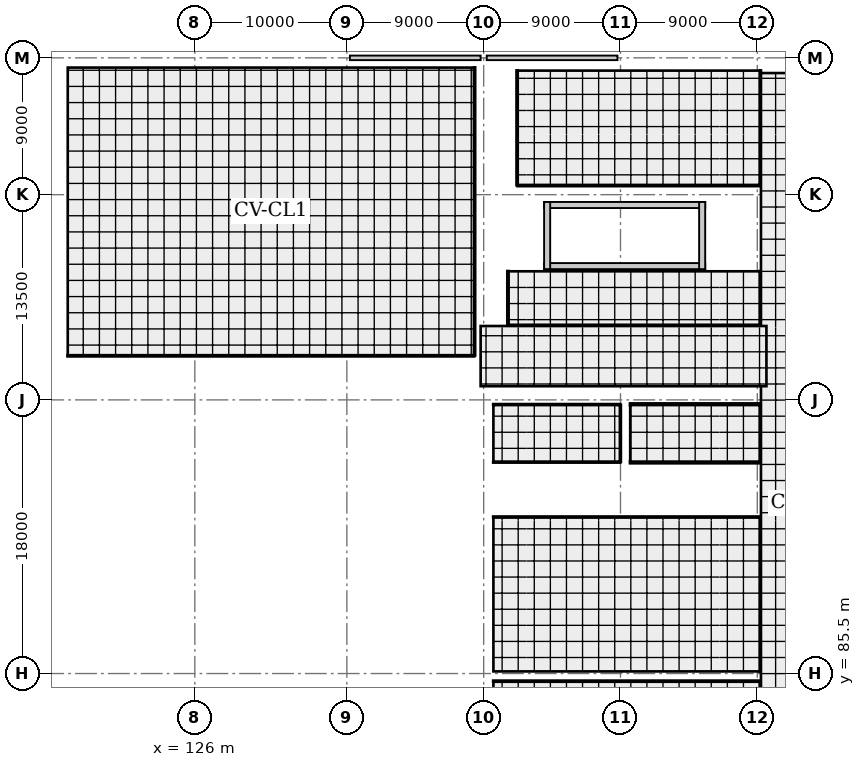
"""IFC4 building model, lengths in metres.
Left out: names, types, materials, properties, quantities, classifications, styles, units other than length and angle.
Written with IfcOpenShell. Run it as: python <this file> out.ifc"""

import sys

from ifc_helpers import new_model, si_unit, direction, frame, frame_2d, origin, origin_2d, place, context, subcontext, project, spatial, rectangle, i_section, extrude, element, fill, save


model = new_model("IFC4")
c1 = context("Model", 3, precision=1e-05, world=origin(), true_north=direction((0.0, 1.0)))
c2 = subcontext(c1, "Body", "Model", "MODEL_VIEW")
j1 = project(units=[si_unit("LENGTHUNIT", "METRE"), si_unit("PLANEANGLEUNIT", "RADIAN")], contexts=[c1])
p1 = place(None, origin())
s1 = spatial("IfcSite", under=j1, at=p1, CompositionType="ELEMENT")
p2 = place(p1, origin())
s2 = spatial("IfcBuilding", under=s1, at=p2, CompositionType="ELEMENT")
p3 = place(p2, frame((0.0, 0.0, 10.8)))
s3 = spatial("IfcBuildingStorey", under=s2, at=p3, CompositionType="ELEMENT", Elevation=10.8)
p4 = place(p3, frame((117.0, 103.5, 0.0), z_axis=(0.0, 0.0, 1.0), x_axis=(1.0, 0.0, 0.0)))
e1 = element("IfcColumn", 1, at=p4, inside=s3, PredefinedType="COLUMN", context=c2, shape_type="SweptSolid", body=[
    extrude(rectangle(XDim=1.2, YDim=1.0, at=origin_2d()), origin(), (0.0, 0.0, 1.0), 3.35),
])
for number, where, z_axis, x_axis in (
    (2, (117.0, 117.0, 0.0), (0.0, 0.0, 1.0), (1.0, 0.0, 0.0)),
    (3, (117.0, 126.0, 0.0), (0.0, 0.0, 1.0), (1.0, 0.0, 0.0)),
):
    element("IfcColumn", number, at=place(p3, frame(where, z_axis=z_axis, x_axis=x_axis)), inside=s3, PredefinedType="COLUMN", context=c2, shape_type="SweptSolid", body=[
        extrude(i_section(OverallWidth=0.4, OverallDepth=0.408, WebThickness=0.021, FlangeThickness=0.021, FilletRadius=0.022, at=origin_2d()), origin(), (0.0, 0.0, 1.0), 3.6),
    ])
for number, where, z_axis, x_axis in (
    (4, (126.0, 85.5, 0.0), (0.0, 0.0, 1.0), (1.0, 0.0, 0.0)),
    (5, (126.0, 94.5, 0.0), (0.0, 0.0, 1.0), (1.0, 0.0, 0.0)),
    (6, (126.0, 103.5, 0.0), (0.0, 0.0, 1.0), (1.0, 0.0, 0.0)),
):
    element("IfcColumn", number, at=place(p3, frame(where, z_axis=z_axis, x_axis=x_axis)), inside=s3, PredefinedType="COLUMN", context=c2, shape_type="SweptSolid", body=[
        extrude(rectangle(XDim=1.2, YDim=1.0, at=origin_2d()), origin(), (0.0, 0.0, 1.0), 3.35),
    ])
for number, where, z_axis, x_axis in (
    (7, (126.0, 117.0, 0.0), (0.0, 0.0, 1.0), (1.0, 0.0, 0.0)),
    (8, (126.0, 126.0, 0.0), (0.0, 0.0, 1.0), (1.0, 0.0, 0.0)),
    (9, (136.0, 103.5, 0.0), (0.0, 0.0, 1.0), (1.0, 0.0, 0.0)),
    (10, (136.0, 117.0, 0.0), (0.0, 0.0, 1.0), (1.0, 0.0, 0.0)),
    (11, (136.0, 126.0, 0.0), (0.0, 0.0, 1.0), (1.0, 0.0, 0.0)),
    (12, (145.0, 85.5, 0.0), (0.0, 0.0, 1.0), (1.0, 0.0, 0.0)),
    (13, (145.0, 94.5, 0.0), (0.0, 0.0, 1.0), (1.0, 0.0, 0.0)),
    (14, (145.0, 103.5, 0.0), (0.0, 0.0, 1.0), (1.0, 0.0, 0.0)),
    (15, (145.0, 117.0, 0.0), (0.0, 0.0, 1.0), (1.0, 0.0, 0.0)),
    (16, (145.0, 126.0, 0.0), (0.0, 0.0, 1.0), (1.0, 0.0, 0.0)),
    (17, (154.0, 85.5, 0.0), (0.0, 0.0, 1.0), (1.0, 0.0, 0.0)),
    (18, (154.0, 94.5, 0.0), (0.0, 0.0, 1.0), (1.0, 0.0, 0.0)),
    (19, (154.0, 103.5, 0.0), (0.0, 0.0, 1.0), (1.0, 0.0, 0.0)),
    (20, (154.0, 117.0, 0.0), (0.0, 0.0, 1.0), (1.0, 0.0, 0.0)),
    (21, (154.0, 126.0, 0.0), (0.0, 0.0, 1.0), (1.0, 0.0, 0.0)),
    (22, (163.0, 85.5, 0.0), (0.0, 0.0, 1.0), (1.0, 0.0, 0.0)),
    (23, (163.0, 94.5, 0.0), (0.0, 0.0, 1.0), (1.0, 0.0, 0.0)),
    (24, (163.0, 103.5, 0.0), (0.0, 0.0, 1.0), (1.0, 0.0, 0.0)),
    (25, (163.0, 117.0, 0.0), (0.0, 0.0, 1.0), (1.0, 0.0, 0.0)),
    (26, (163.0, 126.0, 0.0), (0.0, 0.0, 1.0), (1.0, 0.0, 0.0)),
):
    element("IfcColumn", number, at=place(p3, frame(where, z_axis=z_axis, x_axis=x_axis)), inside=s3, PredefinedType="COLUMN", context=c2, shape_type="SweptSolid", body=[
        extrude(i_section(OverallWidth=0.4, OverallDepth=0.408, WebThickness=0.021, FlangeThickness=0.021, FilletRadius=0.022, at=origin_2d()), origin(), (0.0, 0.0, 1.0), 3.6),
    ])
p5 = place(p3, frame((136.2, 126.0, 0.0), z_axis=(0.0, 0.0, 1.0), x_axis=(1.0, 0.0, 0.0)))
e27 = element("IfcWall", 27, at=p5, inside=s3, PredefinedType="SOLIDWALL", context=c2, shape_type="SweptSolid", body=[
    extrude(rectangle(XDim=8.6, YDim=0.3, at=frame_2d((4.3, 0.0))), origin(), (0.0, 0.0, 1.0), 2.895),
])
p6 = place(p5, frame((1.365, 0.0, 0.9)))
e28 = element("IfcOpeningElement", 28, at=p6, cuts=e27, PredefinedType="OPENING", context=c2, shape_type="SweptSolid", body=[
    extrude(rectangle(XDim=1.8, YDim=1.5, at=frame_2d((0.9, 0.75))), frame((0.0, 0.16, 0.0), z_axis=(0.0, -1.0, 0.0), x_axis=(1.0, 0.0, 0.0)), (0.0, 0.0, 1.0), 0.32),
])
p7 = place(p5, frame((5.585, 0.0, 0.9)))
e29 = element("IfcOpeningElement", 29, at=p7, cuts=e27, PredefinedType="OPENING", context=c2, shape_type="SweptSolid", body=[
    extrude(rectangle(XDim=1.5, YDim=1.5, at=frame_2d((0.75, 0.75))), frame((0.0, 0.16, 0.0), z_axis=(0.0, -1.0, 0.0), x_axis=(1.0, 0.0, 0.0)), (0.0, 0.0, 1.0), 0.32),
])
p8 = place(p3, frame((145.2, 126.0, 0.0), z_axis=(0.0, 0.0, 1.0), x_axis=(1.0, 0.0, 0.0)))
e30 = element("IfcWall", 30, at=p8, inside=s3, PredefinedType="SOLIDWALL", context=c2, shape_type="SweptSolid", body=[
    extrude(rectangle(XDim=8.6, YDim=0.3, at=frame_2d((4.3, 0.0))), origin(), (0.0, 0.0, 1.0), 2.895),
])
p9 = place(p8, frame((1.515, 0.0, 0.9)))
e31 = element("IfcOpeningElement", 31, at=p9, cuts=e30, PredefinedType="OPENING", context=c2, shape_type="SweptSolid", body=[
    extrude(rectangle(XDim=1.5, YDim=1.5, at=frame_2d((0.75, 0.75))), frame((0.0, 0.16, 0.0), z_axis=(0.0, -1.0, 0.0), x_axis=(1.0, 0.0, 0.0)), (0.0, 0.0, 1.0), 0.32),
])
p10 = place(p8, frame((5.735, 0.0, 0.9)))
e32 = element("IfcOpeningElement", 32, at=p10, cuts=e30, PredefinedType="OPENING", context=c2, shape_type="SweptSolid", body=[
    extrude(rectangle(XDim=1.2, YDim=1.4, at=frame_2d((0.6, 0.7))), frame((0.0, 0.16, 0.0), z_axis=(0.0, -1.0, 0.0), x_axis=(1.0, 0.0, 0.0)), (0.0, 0.0, 1.0), 0.32),
])
p11 = place(p3, frame((148.975, 112.3, 0.0), z_axis=(0.0, 0.0, 1.0), x_axis=(1.0, 0.0, 0.0)))
e33 = element("IfcWall", 33, at=p11, inside=s3, PredefinedType="SHEAR", context=c2, shape_type="SweptSolid", body=[
    extrude(rectangle(XDim=10.597, YDim=0.4, at=frame_2d((5.299, 0.0))), origin(), (0.0, 0.0, 1.0), 3.38),
])
p12 = place(p11, frame((0.55, 0.0, 0.0)))
e34 = element("IfcOpeningElement", 34, at=p12, cuts=e33, PredefinedType="OPENING", context=c2, shape_type="SweptSolid", body=[
    extrude(rectangle(XDim=1.3, YDim=2.1, at=frame_2d((0.65, 1.05))), frame((0.0, 0.21, 0.0), z_axis=(0.0, -1.0, 0.0), x_axis=(1.0, 0.0, 0.0)), (0.0, 0.0, 1.0), 0.42),
])
p13 = place(p3, frame((159.573, 116.32, 0.0), z_axis=(0.0, 0.0, 1.0), x_axis=(-1.0, 0.0, 0.0)))
e35 = element("IfcWall", 35, at=p13, inside=s3, PredefinedType="SHEAR", context=c2, shape_type="SweptSolid", body=[
    extrude(rectangle(XDim=10.597, YDim=0.4, at=frame_2d((5.299, 0.0))), origin(), (0.0, 0.0, 1.0), 3.38),
])
for number, where, z_axis, x_axis in (
    (36, (159.373, 112.1, 0.0), (0.0, 0.0, 1.0), (0.0, 1.0, 0.0)),
    (37, (149.175, 116.52, 0.0), (0.0, 0.0, 1.0), (0.0, -1.0, 0.0)),
):
    element("IfcWall", number, at=place(p3, frame(where, z_axis=z_axis, x_axis=x_axis)), inside=s3, PredefinedType="SHEAR", context=c2, shape_type="SweptSolid", body=[
        extrude(rectangle(XDim=4.42, YDim=0.4, at=frame_2d((2.21, 0.0))), origin(), (0.0, 0.0, 1.0), 3.38),
    ])
p14 = place(p3, frame((144.4, 106.4, 0.0), z_axis=(0.0, 0.0, 1.0), x_axis=(-1.0, 0.0, 0.0)))
e38 = element("IfcWall", 38, at=p14, inside=s3, PredefinedType="PARTITIONING", context=c2, shape_type="SweptSolid", body=[
    extrude(rectangle(XDim=26.8, YDim=0.13, at=frame_2d((13.4, 0.0))), origin(), (0.0, 0.0, 1.0), 2.755),
])
p15 = place(p3, frame((144.4, 125.4, 0.0), z_axis=(0.0, 0.0, 1.0), x_axis=(0.0, -1.0, 0.0)))
e39 = element("IfcWall", 39, at=p15, inside=s3, PredefinedType="PARTITIONING", context=c2, shape_type="SweptSolid", body=[
    extrude(rectangle(XDim=19.0, YDim=0.13, at=frame_2d((9.5, 0.0))), origin(), (0.0, 0.0, 1.0), 2.755),
])
p16 = place(p15, frame((9.225, 0.0, 0.0)))
e40 = element("IfcOpeningElement", 40, at=p16, cuts=e39, PredefinedType="OPENING", context=c2, shape_type="SweptSolid", body=[
    extrude(rectangle(XDim=1.55, YDim=2.1, at=frame_2d((0.775, 1.05))), frame((0.0, 0.075, 0.0), z_axis=(0.0, -1.0, 0.0), x_axis=(1.0, 0.0, 0.0)), (0.0, 0.0, 1.0), 0.15),
])
p17 = place(p3, frame((145.6, 85.0, 0.0), z_axis=(0.0, 0.0, 1.0), x_axis=(1.0, 0.0, 0.0)))
e41 = element("IfcWall", 41, at=p17, inside=s3, PredefinedType="PARTITIONING", context=c2, shape_type="SweptSolid", body=[
    extrude(rectangle(XDim=17.6, YDim=0.12, at=frame_2d((8.8, 0.0))), origin(), (0.0, 0.0, 1.0), 2.915),
])
p18 = place(p3, frame((163.2, 85.0, 0.0), z_axis=(0.0, 0.0, 1.0), x_axis=(0.0, -1.0, 0.0)))
e42 = element("IfcWall", 42, at=p18, inside=s3, PredefinedType="PARTITIONING", context=c2, shape_type="SweptSolid", body=[
    extrude(rectangle(XDim=16.8, YDim=0.12, at=frame_2d((8.4, 0.0))), origin(), (0.0, 0.0, 1.0), 2.915),
])
p19 = place(p18, frame((9.375, 0.0, 0.0)))
e43 = element("IfcOpeningElement", 43, at=p19, cuts=e42, PredefinedType="OPENING", context=c2, shape_type="SweptSolid", body=[
    extrude(rectangle(XDim=1.25, YDim=2.1, at=frame_2d((0.625, 1.05))), frame((0.0, 0.07, 0.0), z_axis=(0.0, -1.0, 0.0), x_axis=(1.0, 0.0, 0.0)), (0.0, 0.0, 1.0), 0.14),
])
p20 = place(p3, frame((145.6, 95.8, 0.0), z_axis=(0.0, 0.0, 1.0), x_axis=(1.0, 0.0, 0.0)))
e44 = element("IfcWall", 44, at=p20, inside=s3, PredefinedType="PARTITIONING", context=c2, shape_type="SweptSolid", body=[
    extrude(rectangle(XDim=17.6, YDim=0.11, at=frame_2d((8.8, 0.0))), origin(), (0.0, 0.0, 1.0), 2.965),
])
p21 = place(p3, frame((163.2, 95.8, 0.0), z_axis=(0.0, 0.0, 1.0), x_axis=(0.0, -1.0, 0.0)))
e45 = element("IfcWall", 45, at=p21, inside=s3, PredefinedType="PARTITIONING", context=c2, shape_type="SweptSolid", body=[
    extrude(rectangle(XDim=10.2, YDim=0.11, at=frame_2d((5.1, 0.0))), origin(), (0.0, 0.0, 1.0), 2.915),
])
p22 = place(p21, frame((4.525, 0.0, 0.0)))
e46 = element("IfcOpeningElement", 46, at=p22, cuts=e45, PredefinedType="OPENING", context=c2, shape_type="SweptSolid", body=[
    extrude(rectangle(XDim=1.15, YDim=2.1, at=frame_2d((0.575, 1.05))), frame((0.0, 0.065, 0.0), z_axis=(0.0, -1.0, 0.0), x_axis=(1.0, 0.0, 0.0)), (0.0, 0.0, 1.0), 0.13),
])
p23 = place(p3, frame((154.0, 99.4, 0.0), z_axis=(0.0, 0.0, 1.0), x_axis=(-1.0, 0.0, 0.0)))
e47 = element("IfcWall", 47, at=p23, inside=s3, PredefinedType="PARTITIONING", context=c2, shape_type="SweptSolid", body=[
    extrude(rectangle(XDim=8.4, YDim=0.1, at=frame_2d((4.2, 0.0))), origin(), (0.0, 0.0, 1.0), 2.965),
])
p24 = place(p23, frame((3.75, 0.0, 0.0)))
e48 = element("IfcOpeningElement", 48, at=p24, cuts=e47, PredefinedType="OPENING", context=c2, shape_type="SweptSolid", body=[
    extrude(rectangle(XDim=0.9, YDim=2.1, at=frame_2d((0.45, 1.05))), frame((0.0, 0.06, 0.0), z_axis=(0.0, -1.0, 0.0), x_axis=(1.0, 0.0, 0.0)), (0.0, 0.0, 1.0), 0.12),
])
p25 = place(p3, frame((145.6, 103.2, 0.0), z_axis=(0.0, 0.0, 1.0), x_axis=(1.0, 0.0, 0.0)))
e49 = element("IfcWall", 49, at=p25, inside=s3, PredefinedType="PARTITIONING", context=c2, shape_type="SweptSolid", body=[
    extrude(rectangle(XDim=8.4, YDim=0.1, at=frame_2d((4.2, 0.0))), origin(), (0.0, 0.0, 1.0), 2.755),
])
p26 = place(p3, frame((154.0, 103.2, 0.0), z_axis=(0.0, 0.0, 1.0), x_axis=(0.0, -1.0, 0.0)))
e50 = element("IfcWall", 50, at=p26, inside=s3, PredefinedType="PARTITIONING", context=c2, shape_type="SweptSolid", body=[
    extrude(rectangle(XDim=3.8, YDim=0.1, at=frame_2d((1.9, 0.0))), origin(), (0.0, 0.0, 1.0), 2.915),
])
p27 = place(p3, frame((163.2, 99.4, 0.0), z_axis=(0.0, 0.0, 1.0), x_axis=(-1.0, 0.0, 0.0)))
e51 = element("IfcWall", 51, at=p27, inside=s3, PredefinedType="PARTITIONING", context=c2, shape_type="SweptSolid", body=[
    extrude(rectangle(XDim=8.6, YDim=0.19, at=frame_2d((4.3, 0.0))), origin(), (0.0, 0.0, 1.0), 2.965),
])
p28 = place(p27, frame((3.85, 0.0, 0.0)))
e52 = element("IfcOpeningElement", 52, at=p28, cuts=e51, PredefinedType="OPENING", context=c2, shape_type="SweptSolid", body=[
    extrude(rectangle(XDim=0.9, YDim=2.1, at=frame_2d((0.45, 1.05))), frame((0.0, 0.105, 0.0), z_axis=(0.0, -1.0, 0.0), x_axis=(1.0, 0.0, 0.0)), (0.0, 0.0, 1.0), 0.21),
])
p29 = place(p3, frame((154.6, 103.2, 0.0), z_axis=(0.0, 0.0, 1.0), x_axis=(1.0, 0.0, 0.0)))
e53 = element("IfcWall", 53, at=p29, inside=s3, PredefinedType="PARTITIONING", context=c2, shape_type="SweptSolid", body=[
    extrude(rectangle(XDim=8.6, YDim=0.19, at=frame_2d((4.3, 0.0))), origin(), (0.0, 0.0, 1.0), 2.755),
])
p30 = place(p3, frame((163.2, 103.2, 0.0), z_axis=(0.0, 0.0, 1.0), x_axis=(0.0, -1.0, 0.0)))
e54 = element("IfcWall", 54, at=p30, inside=s3, PredefinedType="PARTITIONING", context=c2, shape_type="SweptSolid", body=[
    extrude(rectangle(XDim=3.8, YDim=0.19, at=frame_2d((1.9, 0.0))), origin(), (0.0, 0.0, 1.0), 2.755),
])
p31 = place(p3, frame((163.2, 108.4, 0.0), z_axis=(0.0, 0.0, 1.0), x_axis=(-1.0, 0.0, 0.0)))
e55 = element("IfcWall", 55, at=p31, inside=s3, PredefinedType="PARTITIONING", context=c2, shape_type="SweptSolid", body=[
    extrude(rectangle(XDim=16.6, YDim=0.14, at=frame_2d((8.3, 0.0))), origin(), (0.0, 0.0, 1.0), 2.755),
])
p32 = place(p31, frame((7.725, 0.0, 0.0)))
e56 = element("IfcOpeningElement", 56, at=p32, cuts=e55, PredefinedType="OPENING", context=c2, shape_type="SweptSolid", body=[
    extrude(rectangle(XDim=1.15, YDim=2.1, at=frame_2d((0.575, 1.05))), frame((0.0, 0.08, 0.0), z_axis=(0.0, -1.0, 0.0), x_axis=(1.0, 0.0, 0.0)), (0.0, 0.0, 1.0), 0.16),
])
p33 = place(p3, frame((146.6, 108.4, 0.0), z_axis=(0.0, 0.0, 1.0), x_axis=(0.0, 1.0, 0.0)))
e57 = element("IfcWall", 57, at=p33, inside=s3, PredefinedType="PARTITIONING", context=c2, shape_type="SweptSolid", body=[
    extrude(rectangle(XDim=3.6, YDim=0.14, at=frame_2d((1.8, 0.0))), origin(), (0.0, 0.0, 1.0), 3.355),
])
p34 = place(p3, frame((163.2, 112.0, 0.0), z_axis=(0.0, 0.0, 1.0), x_axis=(0.0, -1.0, 0.0)))
e58 = element("IfcWall", 58, at=p34, inside=s3, PredefinedType="PARTITIONING", context=c2, shape_type="SweptSolid", body=[
    extrude(rectangle(XDim=3.6, YDim=0.14, at=frame_2d((1.8, 0.0))), origin(), (0.0, 0.0, 1.0), 2.755),
])
p35 = place(p3, frame((163.2, 117.6, 0.0), z_axis=(0.0, 0.0, 1.0), x_axis=(-1.0, 0.0, 0.0)))
e59 = element("IfcWall", 59, at=p35, inside=s3, PredefinedType="PARTITIONING", context=c2, shape_type="SweptSolid", body=[
    extrude(rectangle(XDim=16.0, YDim=0.13, at=frame_2d((8.0, 0.0))), origin(), (0.0, 0.0, 1.0), 2.755),
])
p36 = place(p3, frame((147.2, 117.6, 0.0), z_axis=(0.0, 0.0, 1.0), x_axis=(0.0, 1.0, 0.0)))
e60 = element("IfcWall", 60, at=p36, inside=s3, PredefinedType="PARTITIONING", context=c2, shape_type="SweptSolid", body=[
    extrude(rectangle(XDim=7.6, YDim=0.13, at=frame_2d((3.8, 0.0))), origin(), (0.0, 0.0, 1.0), 2.895),
])
p37 = place(p3, frame((163.2, 125.2, 0.0), z_axis=(0.0, 0.0, 1.0), x_axis=(0.0, -1.0, 0.0)))
e61 = element("IfcWall", 61, at=p37, inside=s3, PredefinedType="PARTITIONING", context=c2, shape_type="SweptSolid", body=[
    extrude(rectangle(XDim=7.6, YDim=0.13, at=frame_2d((3.8, 0.0))), origin(), (0.0, 0.0, 1.0), 2.755),
])
p38 = place(p37, frame((3.225, 0.0, 0.0)))
e62 = element("IfcOpeningElement", 62, at=p38, cuts=e61, PredefinedType="OPENING", context=c2, shape_type="SweptSolid", body=[
    extrude(rectangle(XDim=1.15, YDim=2.1, at=frame_2d((0.575, 1.05))), frame((0.0, 0.075, 0.0), z_axis=(0.0, -1.0, 0.0), x_axis=(1.0, 0.0, 0.0)), (0.0, 0.0, 1.0), 0.15),
])
p39 = place(p6, origin())
e63 = element("IfcWindow", 63, at=p39, inside=s3, PartitioningType="SINGLE_PANEL", PredefinedType="WINDOW", context=c2, shape_type="SweptSolid", body=[
    extrude(rectangle(XDim=1.8, YDim=1.5, at=frame_2d((0.9, 0.75))), frame((0.0, 0.03, 0.0), z_axis=(0.0, -1.0, 0.0), x_axis=(1.0, 0.0, 0.0)), (0.0, 0.0, 1.0), 0.06),
])
fill(e28, e63)
p40 = place(p7, origin())
e64 = element("IfcWindow", 64, at=p40, inside=s3, PartitioningType="SINGLE_PANEL", PredefinedType="WINDOW", context=c2, shape_type="SweptSolid", body=[
    extrude(rectangle(XDim=1.5, YDim=1.5, at=frame_2d((0.75, 0.75))), frame((0.0, 0.03, 0.0), z_axis=(0.0, -1.0, 0.0), x_axis=(1.0, 0.0, 0.0)), (0.0, 0.0, 1.0), 0.06),
])
fill(e29, e64)
p41 = place(p9, origin())
e65 = element("IfcWindow", 65, at=p41, inside=s3, PartitioningType="SINGLE_PANEL", PredefinedType="WINDOW", context=c2, shape_type="SweptSolid", body=[
    extrude(rectangle(XDim=1.5, YDim=1.5, at=frame_2d((0.75, 0.75))), frame((0.0, 0.03, 0.0), z_axis=(0.0, -1.0, 0.0), x_axis=(1.0, 0.0, 0.0)), (0.0, 0.0, 1.0), 0.06),
])
fill(e31, e65)
p42 = place(p10, origin())
e66 = element("IfcWindow", 66, at=p42, inside=s3, PartitioningType="SINGLE_PANEL", PredefinedType="WINDOW", context=c2, shape_type="SweptSolid", body=[
    extrude(rectangle(XDim=1.2, YDim=1.4, at=frame_2d((0.6, 0.7))), frame((0.0, 0.03, 0.0), z_axis=(0.0, -1.0, 0.0), x_axis=(1.0, 0.0, 0.0)), (0.0, 0.0, 1.0), 0.06),
])
fill(e32, e66)
p43 = place(p12, origin())
e67 = element("IfcDoor", 67, at=p43, inside=s3, OperationType="SINGLE_SWING_RIGHT", PredefinedType="DOOR", context=c2, shape_type="SweptSolid", body=[
    extrude(rectangle(XDim=1.3, YDim=2.1, at=frame_2d((0.65, 1.05))), frame((0.0, 0.025, 0.0), z_axis=(0.0, -1.0, 0.0), x_axis=(1.0, 0.0, 0.0)), (0.0, 0.0, 1.0), 0.05),
])
fill(e34, e67)
p44 = place(p16, origin())
e68 = element("IfcDoor", 68, at=p44, inside=s3, OperationType="SINGLE_SWING_RIGHT", PredefinedType="DOOR", context=c2, shape_type="SweptSolid", body=[
    extrude(rectangle(XDim=1.55, YDim=2.1, at=frame_2d((0.775, 1.05))), frame((0.0, 0.025, 0.0), z_axis=(0.0, -1.0, 0.0), x_axis=(1.0, 0.0, 0.0)), (0.0, 0.0, 1.0), 0.05),
])
fill(e40, e68)
p45 = place(p22, origin())
e69 = element("IfcDoor", 69, at=p45, inside=s3, OperationType="SINGLE_SWING_RIGHT", PredefinedType="DOOR", context=c2, shape_type="SweptSolid", body=[
    extrude(rectangle(XDim=1.15, YDim=2.1, at=frame_2d((0.575, 1.05))), frame((0.0, 0.025, 0.0), z_axis=(0.0, -1.0, 0.0), x_axis=(1.0, 0.0, 0.0)), (0.0, 0.0, 1.0), 0.05),
])
fill(e46, e69)
p46 = place(p24, origin())
e70 = element("IfcDoor", 70, at=p46, inside=s3, OperationType="SINGLE_SWING_LEFT", PredefinedType="DOOR", context=c2, shape_type="SweptSolid", body=[
    extrude(rectangle(XDim=0.9, YDim=2.1, at=frame_2d((0.45, 1.05))), frame((0.0, 0.025, 0.0), z_axis=(0.0, -1.0, 0.0), x_axis=(1.0, 0.0, 0.0)), (0.0, 0.0, 1.0), 0.05),
])
fill(e48, e70)
p47 = place(p28, origin())
e71 = element("IfcDoor", 71, at=p47, inside=s3, OperationType="SINGLE_SWING_RIGHT", PredefinedType="DOOR", context=c2, shape_type="SweptSolid", body=[
    extrude(rectangle(XDim=0.9, YDim=2.1, at=frame_2d((0.45, 1.05))), frame((0.0, 0.025, 0.0), z_axis=(0.0, -1.0, 0.0), x_axis=(1.0, 0.0, 0.0)), (0.0, 0.0, 1.0), 0.05),
])
fill(e52, e71)
p48 = place(p32, origin())
e72 = element("IfcDoor", 72, at=p48, inside=s3, OperationType="SINGLE_SWING_RIGHT", PredefinedType="DOOR", context=c2, shape_type="SweptSolid", body=[
    extrude(rectangle(XDim=1.15, YDim=2.1, at=frame_2d((0.575, 1.05))), frame((0.0, 0.025, 0.0), z_axis=(0.0, -1.0, 0.0), x_axis=(1.0, 0.0, 0.0)), (0.0, 0.0, 1.0), 0.05),
])
fill(e56, e72)
p49 = place(p38, origin())
e73 = element("IfcDoor", 73, at=p49, inside=s3, OperationType="SINGLE_SWING_LEFT", PredefinedType="DOOR", context=c2, shape_type="SweptSolid", body=[
    extrude(rectangle(XDim=1.15, YDim=2.1, at=frame_2d((0.575, 1.05))), frame((0.0, 0.025, 0.0), z_axis=(0.0, -1.0, 0.0), x_axis=(1.0, 0.0, 0.0)), (0.0, 0.0, 1.0), 0.05),
])
fill(e62, e73)
save(model, sys.argv[1])
